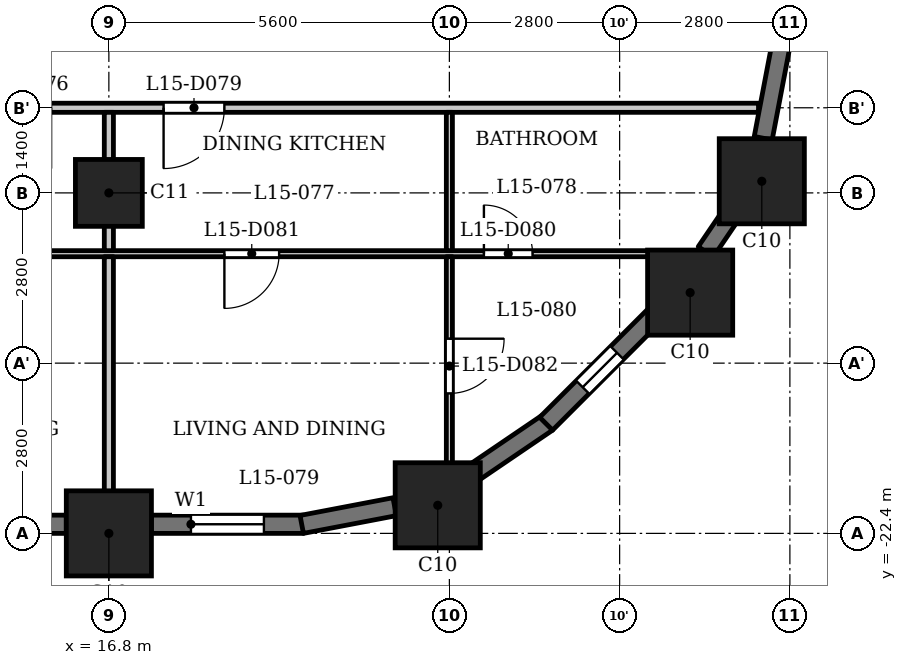
"""IFC4 building model, lengths in metres.
Left out: names, types, materials, properties, quantities, classifications, styles, units other than length and angle.
Written with IfcOpenShell. Run it as: python <this file> out.ifc"""

import sys

from ifc_helpers import new_model, si_unit, direction, frame, frame_2d, origin, origin_2d, place, context, subcontext, project, spatial, rectangle, extrude, element, fill, save


model = new_model("IFC4")
c1 = context("Model", 3, precision=1e-05, world=origin(), true_north=direction((0.0, 1.0)))
c2 = subcontext(c1, "Body", "Model", "MODEL_VIEW")
j1 = project(units=[si_unit("LENGTHUNIT", "METRE"), si_unit("PLANEANGLEUNIT", "RADIAN")], contexts=[c1])
p1 = place(None, origin())
s1 = spatial("IfcSite", under=j1, at=p1, CompositionType="ELEMENT")
p2 = place(p1, origin())
s2 = spatial("IfcBuilding", under=s1, at=p2, CompositionType="ELEMENT")
p3 = place(p2, frame((0.0, 0.0, 62.0)))
s3 = spatial("IfcBuildingStorey", under=s2, at=p3, CompositionType="ELEMENT", Elevation=62.0)
for number, where, z_axis, x_axis in (
    (1, (16.8, -22.4, 0.0), (0.0, 0.0, 1.0), (1.0, 0.0, 0.0)),
    (2, (22.209, -21.938, 0.0), (0.0, 0.0, 1.0), (1.0, 0.0, 0.0)),
    (3, (26.36, -18.44, 0.0), (0.0, 0.0, 1.0), (1.0, 0.0, 0.0)),
    (4, (27.538, -16.609, 0.0), (0.0, 0.0, 1.0), (1.0, 0.0, 0.0)),
):
    element("IfcColumn", number, at=place(p3, frame(where, z_axis=z_axis, x_axis=x_axis)), inside=s3, PredefinedType="COLUMN", context=c2, shape_type="SweptSolid", body=[
        extrude(rectangle(XDim=1.4, YDim=1.4, at=origin_2d()), origin(), (0.0, 0.0, 1.0), 3.5),
    ])
p4 = place(p3, frame((16.8, -16.8, 0.0), z_axis=(0.0, 0.0, 1.0), x_axis=(1.0, 0.0, 0.0)))
e5 = element("IfcColumn", 5, at=p4, inside=s3, PredefinedType="COLUMN", context=c2, shape_type="SweptSolid", body=[
    extrude(rectangle(XDim=1.1, YDim=1.1, at=origin_2d()), origin(), (0.0, 0.0, 1.0), 3.5),
])
p5 = place(p3, frame((11.9, -22.25, 0.0), z_axis=(0.0, 0.0, 1.0), x_axis=(1.0, 0.0, 0.0)))
e6 = element("IfcWall", 6, at=p5, inside=s3, PredefinedType="SOLIDWALL", context=c2, shape_type="SweptSolid", body=[
    extrude(rectangle(XDim=4.2, YDim=0.3, at=frame_2d((2.1, 0.0))), origin(), (0.0, 0.0, 1.0), 2.35),
])
p6 = place(p5, frame((0.3, 0.0, 1.2)))
e7 = element("IfcOpeningElement", 7, at=p6, cuts=e6, PredefinedType="OPENING", context=c2, shape_type="SweptSolid", body=[
    extrude(rectangle(XDim=3.6, YDim=0.95, at=frame_2d((1.8, 0.475))), frame((0.0, 0.16, 0.0), z_axis=(0.0, -1.0, 0.0), x_axis=(1.0, 0.0, 0.0)), (0.0, 0.0, 1.0), 0.32),
])
p7 = place(p3, frame((17.5, -22.25, 0.0), z_axis=(0.0, 0.0, 1.0), x_axis=(1.0, 0.0, 0.0)))
e8 = element("IfcWall", 8, at=p7, inside=s3, PredefinedType="SOLIDWALL", context=c2, shape_type="SweptSolid", body=[
    extrude(rectangle(XDim=2.5, YDim=0.3, at=frame_2d((1.25, 0.0))), origin(), (0.0, 0.0, 1.0), 2.35),
])
p8 = place(p7, frame((0.65, 0.0, 0.6)))
e9 = element("IfcOpeningElement", 9, at=p8, cuts=e8, PredefinedType="OPENING", context=c2, shape_type="SweptSolid", body=[
    extrude(rectangle(XDim=1.2, YDim=1.55, at=frame_2d((0.6, 0.775))), frame((0.0, 0.16, 0.0), z_axis=(0.0, -1.0, 0.0), x_axis=(1.0, 0.0, 0.0)), (0.0, 0.0, 1.0), 0.32),
])
p9 = place(p3, frame((19.972, -22.253, 0.0), z_axis=(0.0, 0.0, 1.0), x_axis=(0.982297345734, 0.187328386968, 0.0)))
e10 = element("IfcWall", 10, at=p9, inside=s3, PredefinedType="SOLIDWALL", context=c2, shape_type="SweptSolid", body=[
    extrude(rectangle(XDim=1.556, YDim=0.3, at=frame_2d((0.778, 0.0))), origin(), (0.0, 0.0, 1.0), 2.35),
])
p10 = place(p3, frame((22.726, -21.454, 0.0), z_axis=(0.0, 0.0, 1.0), x_axis=(0.827019875346, 0.562172683241, 0.0)))
e11 = element("IfcWall", 11, at=p10, inside=s3, PredefinedType="SOLIDWALL", context=c2, shape_type="SweptSolid", body=[
    extrude(rectangle(XDim=1.556, YDim=0.3, at=frame_2d((0.778, 0.0))), origin(), (0.0, 0.0, 1.0), 2.35),
])
p11 = place(p3, frame((23.991, -20.597, 0.0), z_axis=(0.0, 0.0, 1.0), x_axis=(0.707106781187, 0.707106781187, 0.0)))
e12 = element("IfcWall", 12, at=p11, inside=s3, PredefinedType="SOLIDWALL", context=c2, shape_type="SweptSolid", body=[
    extrude(rectangle(XDim=2.5, YDim=0.3, at=frame_2d((1.25, 0.0))), origin(), (0.0, 0.0, 1.0), 2.35),
])
p12 = place(p11, frame((0.85, 0.0, 0.6)))
e13 = element("IfcOpeningElement", 13, at=p12, cuts=e12, PredefinedType="OPENING", context=c2, shape_type="SweptSolid", body=[
    extrude(rectangle(XDim=0.8, YDim=1.55, at=frame_2d((0.4, 0.775))), frame((0.0, 0.16, 0.0), z_axis=(0.0, -1.0, 0.0), x_axis=(1.0, 0.0, 0.0)), (0.0, 0.0, 1.0), 0.32),
])
p13 = place(p3, frame((26.617, -17.769, 0.0), z_axis=(0.0, 0.0, 1.0), x_axis=(0.562000651531, 0.827136788977, 0.0)))
e14 = element("IfcWall", 14, at=p13, inside=s3, PredefinedType="SOLIDWALL", context=c2, shape_type="SweptSolid", body=[
    extrude(rectangle(XDim=0.777, YDim=0.3, at=frame_2d((0.389, 0.0))), origin(), (0.0, 0.0, 1.0), 3.2),
])
p14 = place(p3, frame((27.561, -15.9, 0.0), z_axis=(0.0, 0.0, 1.0), x_axis=(0.187328386968, 0.982297345734, 0.0)))
e15 = element("IfcWall", 15, at=p14, inside=s3, PredefinedType="SOLIDWALL", context=c2, shape_type="SweptSolid", body=[
    extrude(rectangle(XDim=1.556, YDim=0.3, at=frame_2d((0.778, 0.0))), origin(), (0.0, 0.0, 1.0), 2.35),
])
p15 = place(p3, frame((-26.394, -17.8, 0.0), z_axis=(0.0, 0.0, 1.0), x_axis=(1.0, 0.0, 0.0)))
e16 = element("IfcWall", 16, at=p15, inside=s3, PredefinedType="PARTITIONING", context=c2, shape_type="SweptSolid", body=[
    extrude(rectangle(XDim=53.034, YDim=0.1, at=frame_2d((26.517, 0.0))), origin(), (0.0, 0.0, 1.0), 3.2),
])
p16 = place(p15, frame((0.794, 0.0, 0.0)))
e17 = element("IfcOpeningElement", 17, at=p16, cuts=e16, PredefinedType="OPENING", context=c2, shape_type="SweptSolid", body=[
    extrude(rectangle(XDim=0.8, YDim=2.1, at=frame_2d((0.4, 1.05))), frame((0.0, 0.06, 0.0), z_axis=(0.0, -1.0, 0.0), x_axis=(1.0, 0.0, 0.0)), (0.0, 0.0, 1.0), 0.12),
])
p17 = place(p15, frame((5.644, 0.0, 0.0)))
e18 = element("IfcOpeningElement", 18, at=p17, cuts=e16, PredefinedType="OPENING", context=c2, shape_type="SweptSolid", body=[
    extrude(rectangle(XDim=0.9, YDim=2.1, at=frame_2d((0.45, 1.05))), frame((0.0, 0.06, 0.0), z_axis=(0.0, -1.0, 0.0), x_axis=(1.0, 0.0, 0.0)), (0.0, 0.0, 1.0), 0.12),
])
p18 = place(p15, frame((10.494, 0.0, 0.0)))
e19 = element("IfcOpeningElement", 19, at=p18, cuts=e16, PredefinedType="OPENING", context=c2, shape_type="SweptSolid", body=[
    extrude(rectangle(XDim=0.8, YDim=2.1, at=frame_2d((0.4, 1.05))), frame((0.0, 0.06, 0.0), z_axis=(0.0, -1.0, 0.0), x_axis=(1.0, 0.0, 0.0)), (0.0, 0.0, 1.0), 0.12),
])
p19 = place(p15, frame((13.844, 0.0, 0.0)))
e20 = element("IfcOpeningElement", 20, at=p19, cuts=e16, PredefinedType="OPENING", context=c2, shape_type="SweptSolid", body=[
    extrude(rectangle(XDim=0.9, YDim=2.1, at=frame_2d((0.45, 1.05))), frame((0.0, 0.06, 0.0), z_axis=(0.0, -1.0, 0.0), x_axis=(1.0, 0.0, 0.0)), (0.0, 0.0, 1.0), 0.12),
])
p20 = place(p15, frame((19.344, 0.0, 0.0)))
e21 = element("IfcOpeningElement", 21, at=p20, cuts=e16, PredefinedType="OPENING", context=c2, shape_type="SweptSolid", body=[
    extrude(rectangle(XDim=0.8, YDim=2.1, at=frame_2d((0.4, 1.05))), frame((0.0, 0.06, 0.0), z_axis=(0.0, -1.0, 0.0), x_axis=(1.0, 0.0, 0.0)), (0.0, 0.0, 1.0), 0.12),
])
p21 = place(p15, frame((16.094, 0.0, 0.0)))
e22 = element("IfcOpeningElement", 22, at=p21, cuts=e16, PredefinedType="OPENING", context=c2, shape_type="SweptSolid", body=[
    extrude(rectangle(XDim=0.9, YDim=2.1, at=frame_2d((0.45, 1.05))), frame((0.0, 0.06, 0.0), z_axis=(0.0, -1.0, 0.0), x_axis=(1.0, 0.0, 0.0)), (0.0, 0.0, 1.0), 0.12),
])
p22 = place(p15, frame((24.944, 0.0, 0.0)))
e23 = element("IfcOpeningElement", 23, at=p22, cuts=e16, PredefinedType="OPENING", context=c2, shape_type="SweptSolid", body=[
    extrude(rectangle(XDim=0.8, YDim=2.1, at=frame_2d((0.4, 1.05))), frame((0.0, 0.06, 0.0), z_axis=(0.0, -1.0, 0.0), x_axis=(1.0, 0.0, 0.0)), (0.0, 0.0, 1.0), 0.12),
])
p23 = place(p15, frame((22.444, 0.0, 0.0)))
e24 = element("IfcOpeningElement", 24, at=p23, cuts=e16, PredefinedType="OPENING", context=c2, shape_type="SweptSolid", body=[
    extrude(rectangle(XDim=0.9, YDim=2.1, at=frame_2d((0.45, 1.05))), frame((0.0, 0.06, 0.0), z_axis=(0.0, -1.0, 0.0), x_axis=(1.0, 0.0, 0.0)), (0.0, 0.0, 1.0), 0.12),
])
p24 = place(p15, frame((26.944, 0.0, 0.0)))
e25 = element("IfcOpeningElement", 25, at=p24, cuts=e16, PredefinedType="OPENING", context=c2, shape_type="SweptSolid", body=[
    extrude(rectangle(XDim=0.8, YDim=2.1, at=frame_2d((0.4, 1.05))), frame((0.0, 0.06, 0.0), z_axis=(0.0, -1.0, 0.0), x_axis=(1.0, 0.0, 0.0)), (0.0, 0.0, 1.0), 0.12),
])
p25 = place(p15, frame((29.794, 0.0, 0.0)))
e26 = element("IfcOpeningElement", 26, at=p25, cuts=e16, PredefinedType="OPENING", context=c2, shape_type="SweptSolid", body=[
    extrude(rectangle(XDim=0.9, YDim=2.1, at=frame_2d((0.45, 1.05))), frame((0.0, 0.06, 0.0), z_axis=(0.0, -1.0, 0.0), x_axis=(1.0, 0.0, 0.0)), (0.0, 0.0, 1.0), 0.12),
])
p26 = place(p15, frame((33.394, 0.0, 0.0)))
e27 = element("IfcOpeningElement", 27, at=p26, cuts=e16, PredefinedType="OPENING", context=c2, shape_type="SweptSolid", body=[
    extrude(rectangle(XDim=0.9, YDim=2.1, at=frame_2d((0.45, 1.05))), frame((0.0, 0.06, 0.0), z_axis=(0.0, -1.0, 0.0), x_axis=(1.0, 0.0, 0.0)), (0.0, 0.0, 1.0), 0.12),
])
p27 = place(p15, frame((34.944, 0.0, 0.0)))
e28 = element("IfcOpeningElement", 28, at=p27, cuts=e16, PredefinedType="OPENING", context=c2, shape_type="SweptSolid", body=[
    extrude(rectangle(XDim=0.9, YDim=2.1, at=frame_2d((0.45, 1.05))), frame((0.0, 0.06, 0.0), z_axis=(0.0, -1.0, 0.0), x_axis=(1.0, 0.0, 0.0)), (0.0, 0.0, 1.0), 0.12),
])
p28 = place(p15, frame((38.144, 0.0, 0.0)))
e29 = element("IfcOpeningElement", 29, at=p28, cuts=e16, PredefinedType="OPENING", context=c2, shape_type="SweptSolid", body=[
    extrude(rectangle(XDim=0.8, YDim=2.1, at=frame_2d((0.4, 1.05))), frame((0.0, 0.06, 0.0), z_axis=(0.0, -1.0, 0.0), x_axis=(1.0, 0.0, 0.0)), (0.0, 0.0, 1.0), 0.12),
])
p29 = place(p15, frame((40.244, 0.0, 0.0)))
e30 = element("IfcOpeningElement", 30, at=p29, cuts=e16, PredefinedType="OPENING", context=c2, shape_type="SweptSolid", body=[
    extrude(rectangle(XDim=0.9, YDim=2.1, at=frame_2d((0.45, 1.05))), frame((0.0, 0.06, 0.0), z_axis=(0.0, -1.0, 0.0), x_axis=(1.0, 0.0, 0.0)), (0.0, 0.0, 1.0), 0.12),
])
p30 = place(p15, frame((49.362, 0.0, 0.0)))
e31 = element("IfcOpeningElement", 31, at=p30, cuts=e16, PredefinedType="OPENING", context=c2, shape_type="SweptSolid", body=[
    extrude(rectangle(XDim=0.8, YDim=2.1, at=frame_2d((0.4, 1.05))), frame((0.0, 0.06, 0.0), z_axis=(0.0, -1.0, 0.0), x_axis=(1.0, 0.0, 0.0)), (0.0, 0.0, 1.0), 0.12),
])
p31 = place(p15, frame((45.094, 0.0, 0.0)))
e32 = element("IfcOpeningElement", 32, at=p31, cuts=e16, PredefinedType="OPENING", context=c2, shape_type="SweptSolid", body=[
    extrude(rectangle(XDim=0.9, YDim=2.1, at=frame_2d((0.45, 1.05))), frame((0.0, 0.06, 0.0), z_axis=(0.0, -1.0, 0.0), x_axis=(1.0, 0.0, 0.0)), (0.0, 0.0, 1.0), 0.12),
])
p32 = place(p3, frame((-27.484, -15.4, 0.0), z_axis=(0.0, 0.0, 1.0), x_axis=(1.0, 0.0, 0.0)))
e33 = element("IfcWall", 33, at=p32, inside=s3, PredefinedType="PARTITIONING", context=c2, shape_type="SweptSolid", body=[
    extrude(rectangle(XDim=54.968, YDim=0.15, at=frame_2d((27.484, 0.0))), origin(), (0.0, 0.0, 1.0), 3.2),
])
p33 = place(p32, frame((5.734, 0.0, 0.0)))
e34 = element("IfcOpeningElement", 34, at=p33, cuts=e33, PredefinedType="OPENING", context=c2, shape_type="SweptSolid", body=[
    extrude(rectangle(XDim=1.0, YDim=2.1, at=frame_2d((0.5, 1.05))), frame((0.0, 0.085, 0.0), z_axis=(0.0, -1.0, 0.0), x_axis=(1.0, 0.0, 0.0)), (0.0, 0.0, 1.0), 0.17),
])
p34 = place(p32, frame((13.934, 0.0, 0.0)))
e35 = element("IfcOpeningElement", 35, at=p34, cuts=e33, PredefinedType="OPENING", context=c2, shape_type="SweptSolid", body=[
    extrude(rectangle(XDim=1.0, YDim=2.1, at=frame_2d((0.5, 1.05))), frame((0.0, 0.085, 0.0), z_axis=(0.0, -1.0, 0.0), x_axis=(1.0, 0.0, 0.0)), (0.0, 0.0, 1.0), 0.17),
])
p35 = place(p32, frame((18.184, 0.0, 0.0)))
e36 = element("IfcOpeningElement", 36, at=p35, cuts=e33, PredefinedType="OPENING", context=c2, shape_type="SweptSolid", body=[
    extrude(rectangle(XDim=1.0, YDim=2.1, at=frame_2d((0.5, 1.05))), frame((0.0, 0.085, 0.0), z_axis=(0.0, -1.0, 0.0), x_axis=(1.0, 0.0, 0.0)), (0.0, 0.0, 1.0), 0.17),
])
p36 = place(p32, frame((22.534, 0.0, 0.0)))
e37 = element("IfcOpeningElement", 37, at=p36, cuts=e33, PredefinedType="OPENING", context=c2, shape_type="SweptSolid", body=[
    extrude(rectangle(XDim=1.0, YDim=2.1, at=frame_2d((0.5, 1.05))), frame((0.0, 0.085, 0.0), z_axis=(0.0, -1.0, 0.0), x_axis=(1.0, 0.0, 0.0)), (0.0, 0.0, 1.0), 0.17),
])
p37 = place(p32, frame((36.984, 0.0, 0.0)))
e38 = element("IfcOpeningElement", 38, at=p37, cuts=e33, PredefinedType="OPENING", context=c2, shape_type="SweptSolid", body=[
    extrude(rectangle(XDim=1.0, YDim=2.1, at=frame_2d((0.5, 1.05))), frame((0.0, 0.085, 0.0), z_axis=(0.0, -1.0, 0.0), x_axis=(1.0, 0.0, 0.0)), (0.0, 0.0, 1.0), 0.17),
])
p38 = place(p32, frame((42.334, 0.0, 0.0)))
e39 = element("IfcOpeningElement", 39, at=p38, cuts=e33, PredefinedType="OPENING", context=c2, shape_type="SweptSolid", body=[
    extrude(rectangle(XDim=1.0, YDim=2.1, at=frame_2d((0.5, 1.05))), frame((0.0, 0.085, 0.0), z_axis=(0.0, -1.0, 0.0), x_axis=(1.0, 0.0, 0.0)), (0.0, 0.0, 1.0), 0.17),
])
p39 = place(p32, frame((45.184, 0.0, 0.0)))
e40 = element("IfcOpeningElement", 40, at=p39, cuts=e33, PredefinedType="OPENING", context=c2, shape_type="SweptSolid", body=[
    extrude(rectangle(XDim=1.0, YDim=2.1, at=frame_2d((0.5, 1.05))), frame((0.0, 0.085, 0.0), z_axis=(0.0, -1.0, 0.0), x_axis=(1.0, 0.0, 0.0)), (0.0, 0.0, 1.0), 0.17),
])
p40 = place(p3, frame((16.8, -23.08, 0.0), z_axis=(0.0, 0.0, 1.0), x_axis=(0.0, 1.0, 0.0)))
e41 = element("IfcWall", 41, at=p40, inside=s3, PredefinedType="PARTITIONING", context=c2, shape_type="SweptSolid", body=[
    extrude(rectangle(XDim=5.23, YDim=0.15, at=frame_2d((2.615, 0.0))), origin(), (0.0, 0.0, 1.0), 3.2),
])
p41 = place(p3, frame((16.8, -17.75, 0.0), z_axis=(0.0, 0.0, 1.0), x_axis=(0.0, 1.0, 0.0)))
e42 = element("IfcWall", 42, at=p41, inside=s3, PredefinedType="PARTITIONING", context=c2, shape_type="SweptSolid", body=[
    extrude(rectangle(XDim=2.275, YDim=0.15, at=frame_2d((1.137, 0.0))), origin(), (0.0, 0.0, 1.0), 3.2),
])
p42 = place(p3, frame((22.4, -21.72, 0.0), z_axis=(0.0, 0.0, 1.0), x_axis=(0.0, 1.0, 0.0)))
e43 = element("IfcWall", 43, at=p42, inside=s3, PredefinedType="PARTITIONING", context=c2, shape_type="SweptSolid", body=[
    extrude(rectangle(XDim=3.87, YDim=0.1, at=frame_2d((1.935, 0.0))), origin(), (0.0, 0.0, 1.0), 3.2),
])
p43 = place(p42, frame((1.622, 0.0, 0.0)))
e44 = element("IfcOpeningElement", 44, at=p43, cuts=e43, PredefinedType="OPENING", context=c2, shape_type="SweptSolid", body=[
    extrude(rectangle(XDim=0.9, YDim=2.1, at=frame_2d((0.45, 1.05))), frame((0.0, 0.06, 0.0), z_axis=(0.0, -1.0, 0.0), x_axis=(1.0, 0.0, 0.0)), (0.0, 0.0, 1.0), 0.12),
])
p44 = place(p3, frame((22.4, -17.75, 0.0), z_axis=(0.0, 0.0, 1.0), x_axis=(0.0, 1.0, 0.0)))
e45 = element("IfcWall", 45, at=p44, inside=s3, PredefinedType="PARTITIONING", context=c2, shape_type="SweptSolid", body=[
    extrude(rectangle(XDim=2.275, YDim=0.1, at=frame_2d((1.137, 0.0))), origin(), (0.0, 0.0, 1.0), 3.2),
])
p45 = place(p39, origin())
e46 = element("IfcDoor", 46, at=p45, inside=s3, OperationType="SINGLE_SWING_LEFT", PredefinedType="DOOR", context=c2, shape_type="SweptSolid", body=[
    extrude(rectangle(XDim=1.0, YDim=2.1, at=frame_2d((0.5, 1.05))), frame((0.0, 0.025, 0.0), z_axis=(0.0, -1.0, 0.0), x_axis=(1.0, 0.0, 0.0)), (0.0, 0.0, 1.0), 0.05),
])
fill(e40, e46)
p46 = place(p30, origin())
e47 = element("IfcDoor", 47, at=p46, inside=s3, OperationType="SINGLE_SWING_RIGHT", PredefinedType="DOOR", context=c2, shape_type="SweptSolid", body=[
    extrude(rectangle(XDim=0.8, YDim=2.1, at=frame_2d((0.4, 1.05))), frame((0.0, 0.025, 0.0), z_axis=(0.0, -1.0, 0.0), x_axis=(1.0, 0.0, 0.0)), (0.0, 0.0, 1.0), 0.05),
])
fill(e31, e47)
p47 = place(p31, origin())
e48 = element("IfcDoor", 48, at=p47, inside=s3, OperationType="SINGLE_SWING_LEFT", PredefinedType="DOOR", context=c2, shape_type="SweptSolid", body=[
    extrude(rectangle(XDim=0.9, YDim=2.1, at=frame_2d((0.45, 1.05))), frame((0.0, 0.025, 0.0), z_axis=(0.0, -1.0, 0.0), x_axis=(1.0, 0.0, 0.0)), (0.0, 0.0, 1.0), 0.05),
])
fill(e32, e48)
p48 = place(p43, origin())
e49 = element("IfcDoor", 49, at=p48, inside=s3, OperationType="SINGLE_SWING_RIGHT", PredefinedType="DOOR", context=c2, shape_type="SweptSolid", body=[
    extrude(rectangle(XDim=0.9, YDim=2.1, at=frame_2d((0.45, 1.05))), frame((0.0, 0.025, 0.0), z_axis=(0.0, -1.0, 0.0), x_axis=(1.0, 0.0, 0.0)), (0.0, 0.0, 1.0), 0.05),
])
fill(e44, e49)
p49 = place(p8, origin())
e50 = element("IfcWindow", 50, at=p49, inside=s3, PartitioningType="SINGLE_PANEL", PredefinedType="WINDOW", context=c2, shape_type="SweptSolid", body=[
    extrude(rectangle(XDim=1.2, YDim=1.55, at=frame_2d((0.6, 0.775))), frame((0.0, 0.03, 0.0), z_axis=(0.0, -1.0, 0.0), x_axis=(1.0, 0.0, 0.0)), (0.0, 0.0, 1.0), 0.06),
])
fill(e9, e50)
p50 = place(p12, origin())
e51 = element("IfcWindow", 51, at=p50, inside=s3, PartitioningType="SINGLE_PANEL", PredefinedType="WINDOW", context=c2, shape_type="SweptSolid", body=[
    extrude(rectangle(XDim=0.8, YDim=1.55, at=frame_2d((0.4, 0.775))), frame((0.0, 0.03, 0.0), z_axis=(0.0, -1.0, 0.0), x_axis=(1.0, 0.0, 0.0)), (0.0, 0.0, 1.0), 0.06),
])
fill(e13, e51)
save(model, sys.argv[1])
